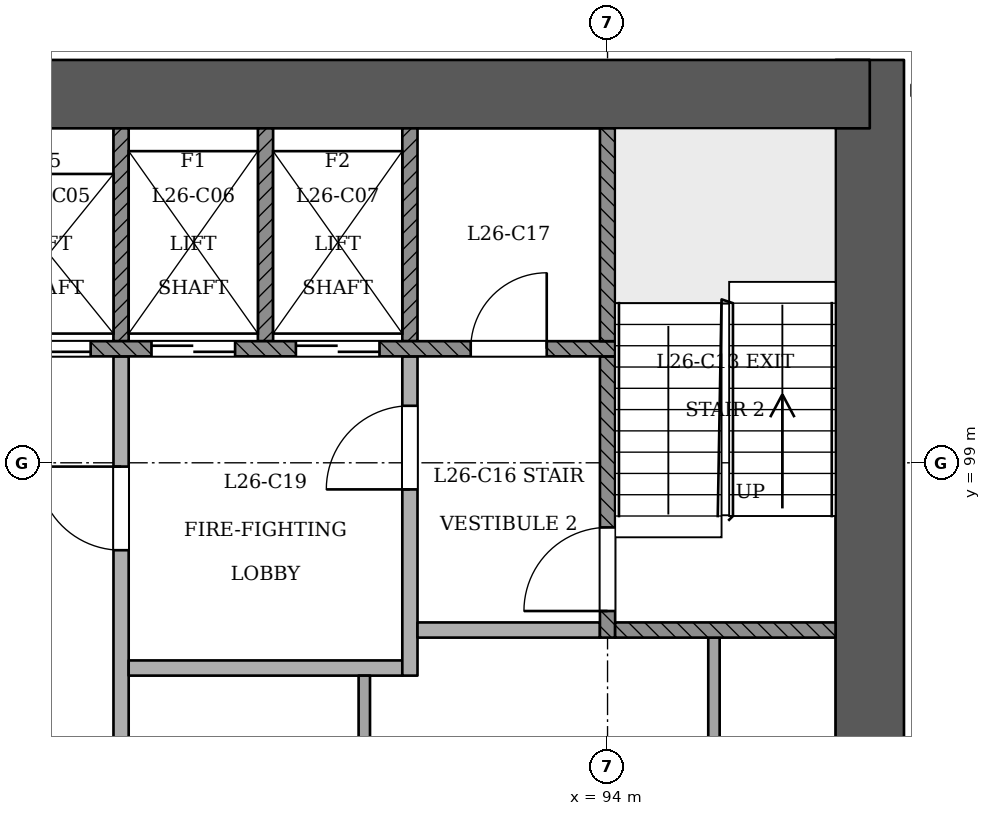
"""IFC4 building model, lengths in metres.
Left out: names, types, materials, properties, quantities, classifications, styles, units other than length and angle.
Written with IfcOpenShell. Run it as: python <this file> out.ifc"""

import sys

from ifc_helpers import new_model, si_unit, direction, frame, frame_2d, origin, place, context, subcontext, project, spatial, rectangle, extrude, element, fill, save


model = new_model("IFC4")
c1 = context("Model", 3, precision=1e-05, world=origin(), true_north=direction((0.0, 1.0)))
c2 = subcontext(c1, "Body", "Model", "MODEL_VIEW")
j1 = project(units=[si_unit("LENGTHUNIT", "METRE"), si_unit("PLANEANGLEUNIT", "RADIAN")], contexts=[c1])
p1 = place(None, origin())
s1 = spatial("IfcSite", under=j1, at=p1, CompositionType="ELEMENT")
p2 = place(p1, origin())
s2 = spatial("IfcBuilding", under=s1, at=p2, CompositionType="ELEMENT")
p3 = place(p2, frame((0.0, 0.0, 104.4)))
s3 = spatial("IfcBuildingStorey", under=s2, at=p3, CompositionType="ELEMENT", Elevation=104.4)
p4 = place(p3, frame((97.45, 92.95, 0.0), z_axis=(0.0, 0.0, 1.0), x_axis=(0.0, 1.0, 0.0)))
e1 = element("IfcWall", 1, at=p4, inside=s3, PredefinedType="SHEAR", context=c2, shape_type="SweptSolid", body=[
    extrude(rectangle(XDim=11.35, YDim=0.9, at=frame_2d((5.675, 0.0))), origin(), (0.0, 0.0, 1.0), 3.6),
])
p5 = place(p3, frame((97.45, 103.85, 0.0), z_axis=(0.0, 0.0, 1.0), x_axis=(-1.0, 0.0, 0.0)))
e2 = element("IfcWall", 2, at=p5, inside=s3, PredefinedType="SHEAR", context=c2, shape_type="SweptSolid", body=[
    extrude(rectangle(XDim=25.35, YDim=0.9, at=frame_2d((12.675, 0.0))), origin(), (0.0, 0.0, 1.0), 3.6),
])
p6 = place(p3, frame((85.42, 61.685, 0.0), z_axis=(0.0, 0.0, 1.0), x_axis=(0.500001045382, 0.866024800232, 0.0)))
e3 = element("IfcWall", 3, at=p6, inside=s3, PredefinedType="PARTITIONING", context=c2, shape_type="SweptSolid", body=[
    extrude(rectangle(XDim=41.671, YDim=0.15, at=frame_2d((20.836, 0.0))), origin(), (0.0, 0.0, 1.0), 2.7),
])
p7 = place(p6, frame((0.239, 0.0, 0.0)))
e4 = element("IfcOpeningElement", 4, at=p7, cuts=e3, PredefinedType="OPENING", context=c2, shape_type="SweptSolid", body=[
    extrude(rectangle(XDim=1.2, YDim=2.1, at=frame_2d((0.6, 1.05))), frame((0.0, 0.085, 0.0), z_axis=(0.0, -1.0, 0.0), x_axis=(1.0, 0.0, 0.0)), (0.0, 0.0, 1.0), 0.171),
])
p8 = place(p6, frame((5.636, 0.0, 0.0)))
e5 = element("IfcOpeningElement", 5, at=p8, cuts=e3, PredefinedType="OPENING", context=c2, shape_type="SweptSolid", body=[
    extrude(rectangle(XDim=1.2, YDim=2.1, at=frame_2d((0.6, 1.05))), frame((0.0, 0.085, 0.0), z_axis=(0.0, -1.0, 0.0), x_axis=(1.0, 0.0, 0.0)), (0.0, 0.0, 1.0), 0.171),
])
p9 = place(p6, frame((13.586, 0.0, 0.0)))
e6 = element("IfcOpeningElement", 6, at=p9, cuts=e3, PredefinedType="OPENING", context=c2, shape_type="SweptSolid", body=[
    extrude(rectangle(XDim=1.0, YDim=2.1, at=frame_2d((0.5, 1.05))), frame((0.0, 0.085, 0.0), z_axis=(0.0, -1.0, 0.0), x_axis=(1.0, 0.0, 0.0)), (0.0, 0.0, 1.0), 0.171),
])
p10 = place(p6, frame((18.086, 0.0, 0.0)))
e7 = element("IfcOpeningElement", 7, at=p10, cuts=e3, PredefinedType="OPENING", context=c2, shape_type="SweptSolid", body=[
    extrude(rectangle(XDim=1.0, YDim=2.1, at=frame_2d((0.5, 1.05))), frame((0.0, 0.085, 0.0), z_axis=(0.0, -1.0, 0.0), x_axis=(1.0, 0.0, 0.0)), (0.0, 0.0, 1.0), 0.171),
])
p11 = place(p6, frame((21.556, 0.0, 0.0)))
e8 = element("IfcOpeningElement", 8, at=p11, cuts=e3, PredefinedType="OPENING", context=c2, shape_type="SweptSolid", body=[
    extrude(rectangle(XDim=1.0, YDim=2.1, at=frame_2d((0.5, 1.05))), frame((0.0, 0.085, 0.0), z_axis=(0.0, -1.0, 0.0), x_axis=(1.0, 0.0, 0.0)), (0.0, 0.0, 1.0), 0.171),
])
p12 = place(p6, frame((27.086, 0.0, 0.0)))
e9 = element("IfcOpeningElement", 9, at=p12, cuts=e3, PredefinedType="OPENING", context=c2, shape_type="SweptSolid", body=[
    extrude(rectangle(XDim=1.0, YDim=2.1, at=frame_2d((0.5, 1.05))), frame((0.0, 0.085, 0.0), z_axis=(0.0, -1.0, 0.0), x_axis=(1.0, 0.0, 0.0)), (0.0, 0.0, 1.0), 0.171),
])
p13 = place(p6, frame((30.556, 0.0, 0.0)))
e10 = element("IfcOpeningElement", 10, at=p13, cuts=e3, PredefinedType="OPENING", context=c2, shape_type="SweptSolid", body=[
    extrude(rectangle(XDim=1.0, YDim=2.1, at=frame_2d((0.5, 1.05))), frame((0.0, 0.085, 0.0), z_axis=(0.0, -1.0, 0.0), x_axis=(1.0, 0.0, 0.0)), (0.0, 0.0, 1.0), 0.171),
])
p14 = place(p6, frame((37.604, 0.0, 0.0)))
e11 = element("IfcOpeningElement", 11, at=p14, cuts=e3, PredefinedType="OPENING", context=c2, shape_type="SweptSolid", body=[
    extrude(rectangle(XDim=1.2, YDim=2.1, at=frame_2d((0.6, 1.05))), frame((0.0, 0.085, 0.0), z_axis=(0.0, -1.0, 0.0), x_axis=(1.0, 0.0, 0.0)), (0.0, 0.0, 1.0), 0.171),
])
p15 = place(p3, frame((87.6, 93.4, 0.0), z_axis=(0.0, 0.0, 1.0), x_axis=(0.0, 1.0, 0.0)))
e12 = element("IfcWall", 12, at=p15, inside=s3, PredefinedType="PARTITIONING", context=c2, shape_type="SweptSolid", body=[
    extrude(rectangle(XDim=7.0, YDim=0.2, at=frame_2d((3.5, 0.0))), origin(), (0.0, 0.0, 1.0), 3.1),
])
p16 = place(p15, frame((4.45, 0.0, 0.0)))
e13 = element("IfcOpeningElement", 13, at=p16, cuts=e12, PredefinedType="OPENING", context=c2, shape_type="SweptSolid", body=[
    extrude(rectangle(XDim=1.1, YDim=2.1, at=frame_2d((0.55, 1.05))), frame((0.0, 0.11, 0.0), z_axis=(0.0, -1.0, 0.0), x_axis=(1.0, 0.0, 0.0)), (0.0, 0.0, 1.0), 0.221),
])
p17 = place(p3, frame((90.8, 93.4, 0.0), z_axis=(0.0, 0.0, 1.0), x_axis=(0.0, 1.0, 0.0)))
e14 = element("IfcWall", 14, at=p17, inside=s3, PredefinedType="PARTITIONING", context=c2, shape_type="SweptSolid", body=[
    extrude(rectangle(XDim=2.8, YDim=0.15, at=frame_2d((1.4, 0.0))), origin(), (0.0, 0.0, 1.0), 3.1),
])
p18 = place(p3, frame((95.4, 93.4, 0.0), z_axis=(0.0, 0.0, 1.0), x_axis=(0.0, 1.0, 0.0)))
e15 = element("IfcWall", 15, at=p18, inside=s3, PredefinedType="PARTITIONING", context=c2, shape_type="SweptSolid", body=[
    extrude(rectangle(XDim=3.3, YDim=0.15, at=frame_2d((1.65, 0.0))), origin(), (0.0, 0.0, 1.0), 3.1),
])
p19 = place(p3, frame((87.7, 96.3, 0.0), z_axis=(0.0, 0.0, 1.0), x_axis=(1.0, 0.0, 0.0)))
e16 = element("IfcWall", 16, at=p19, inside=s3, PredefinedType="PARTITIONING", context=c2, shape_type="SweptSolid", body=[
    extrude(rectangle(XDim=3.6, YDim=0.2, at=frame_2d((1.8, 0.0))), origin(), (0.0, 0.0, 1.0), 3.1),
])
p20 = place(p3, frame((91.4, 96.2, 0.0), z_axis=(0.0, 0.0, 1.0), x_axis=(0.0, 1.0, 0.0)))
e17 = element("IfcWall", 17, at=p20, inside=s3, PredefinedType="PARTITIONING", context=c2, shape_type="SweptSolid", body=[
    extrude(rectangle(XDim=4.2, YDim=0.2, at=frame_2d((2.1, 0.0))), origin(), (0.0, 0.0, 1.0), 3.1),
])
p21 = place(p20, frame((2.45, 0.0, 0.0)))
e18 = element("IfcOpeningElement", 18, at=p21, cuts=e17, PredefinedType="OPENING", context=c2, shape_type="SweptSolid", body=[
    extrude(rectangle(XDim=1.1, YDim=2.1, at=frame_2d((0.55, 1.05))), frame((0.0, 0.11, 0.0), z_axis=(0.0, -1.0, 0.0), x_axis=(1.0, 0.0, 0.0)), (0.0, 0.0, 1.0), 0.221),
])
p22 = place(p3, frame((91.5, 96.8, 0.0), z_axis=(0.0, 0.0, 1.0), x_axis=(1.0, 0.0, 0.0)))
e19 = element("IfcWall", 19, at=p22, inside=s3, PredefinedType="PARTITIONING", context=c2, shape_type="SweptSolid", body=[
    extrude(rectangle(XDim=2.4, YDim=0.2, at=frame_2d((1.2, 0.0))), origin(), (0.0, 0.0, 1.0), 3.1),
])
p23 = place(p3, frame((94.0, 96.7, 0.0), z_axis=(0.0, 0.0, 1.0), x_axis=(0.0, 1.0, 0.0)))
e20 = element("IfcWall", 20, at=p23, inside=s3, PredefinedType="SOLIDWALL", context=c2, shape_type="SweptSolid", body=[
    extrude(rectangle(XDim=3.7, YDim=0.2, at=frame_2d((1.85, 0.0))), origin(), (0.0, 0.0, 1.0), 3.1),
])
p24 = place(p23, frame((0.35, 0.0, 0.0)))
e21 = element("IfcOpeningElement", 21, at=p24, cuts=e20, PredefinedType="OPENING", context=c2, shape_type="SweptSolid", body=[
    extrude(rectangle(XDim=1.1, YDim=2.1, at=frame_2d((0.55, 1.05))), frame((0.0, 0.11, 0.0), z_axis=(0.0, -1.0, 0.0), x_axis=(1.0, 0.0, 0.0)), (0.0, 0.0, 1.0), 0.221),
])
p25 = place(p3, frame((94.1, 96.8, 0.0), z_axis=(0.0, 0.0, 1.0), x_axis=(1.0, 0.0, 0.0)))
e22 = element("IfcWall", 22, at=p25, inside=s3, PredefinedType="SOLIDWALL", context=c2, shape_type="SweptSolid", body=[
    extrude(rectangle(XDim=2.9, YDim=0.2, at=frame_2d((1.45, 0.0))), origin(), (0.0, 0.0, 1.0), 3.1),
])
p26 = place(p3, frame((75.9, 100.5, 0.0), z_axis=(0.0, 0.0, 1.0), x_axis=(1.0, 0.0, 0.0)))
e23 = element("IfcWall", 23, at=p26, inside=s3, PredefinedType="SOLIDWALL", context=c2, shape_type="SweptSolid", body=[
    extrude(rectangle(XDim=18.2, YDim=0.2, at=frame_2d((9.1, 0.0))), origin(), (0.0, 0.0, 1.0), 3.1),
])
p27 = place(p26, frame((2.6, 0.0, 0.0)))
e24 = element("IfcOpeningElement", 24, at=p27, cuts=e23, PredefinedType="OPENING", context=c2, shape_type="SweptSolid", body=[
    extrude(rectangle(XDim=1.1, YDim=2.1, at=frame_2d((0.55, 1.05))), frame((0.0, 0.11, 0.0), z_axis=(0.0, -1.0, 0.0), x_axis=(1.0, 0.0, 0.0)), (0.0, 0.0, 1.0), 0.221),
])
p28 = place(p26, frame((4.5, 0.0, 0.0)))
e25 = element("IfcOpeningElement", 25, at=p28, cuts=e23, PredefinedType="OPENING", context=c2, shape_type="SweptSolid", body=[
    extrude(rectangle(XDim=1.1, YDim=2.1, at=frame_2d((0.55, 1.05))), frame((0.0, 0.11, 0.0), z_axis=(0.0, -1.0, 0.0), x_axis=(1.0, 0.0, 0.0)), (0.0, 0.0, 1.0), 0.221),
])
p29 = place(p26, frame((6.4, 0.0, 0.0)))
e26 = element("IfcOpeningElement", 26, at=p29, cuts=e23, PredefinedType="OPENING", context=c2, shape_type="SweptSolid", body=[
    extrude(rectangle(XDim=1.1, YDim=2.1, at=frame_2d((0.55, 1.05))), frame((0.0, 0.11, 0.0), z_axis=(0.0, -1.0, 0.0), x_axis=(1.0, 0.0, 0.0)), (0.0, 0.0, 1.0), 0.221),
])
p30 = place(p26, frame((8.3, 0.0, 0.0)))
e27 = element("IfcOpeningElement", 27, at=p30, cuts=e23, PredefinedType="OPENING", context=c2, shape_type="SweptSolid", body=[
    extrude(rectangle(XDim=1.1, YDim=2.1, at=frame_2d((0.55, 1.05))), frame((0.0, 0.11, 0.0), z_axis=(0.0, -1.0, 0.0), x_axis=(1.0, 0.0, 0.0)), (0.0, 0.0, 1.0), 0.221),
])
p31 = place(p26, frame((10.2, 0.0, 0.0)))
e28 = element("IfcOpeningElement", 28, at=p31, cuts=e23, PredefinedType="OPENING", context=c2, shape_type="SweptSolid", body=[
    extrude(rectangle(XDim=1.1, YDim=2.1, at=frame_2d((0.55, 1.05))), frame((0.0, 0.11, 0.0), z_axis=(0.0, -1.0, 0.0), x_axis=(1.0, 0.0, 0.0)), (0.0, 0.0, 1.0), 0.221),
])
p32 = place(p26, frame((12.1, 0.0, 0.0)))
e29 = element("IfcOpeningElement", 29, at=p32, cuts=e23, PredefinedType="OPENING", context=c2, shape_type="SweptSolid", body=[
    extrude(rectangle(XDim=1.1, YDim=2.1, at=frame_2d((0.55, 1.05))), frame((0.0, 0.11, 0.0), z_axis=(0.0, -1.0, 0.0), x_axis=(1.0, 0.0, 0.0)), (0.0, 0.0, 1.0), 0.221),
])
p33 = place(p26, frame((14.0, 0.0, 0.0)))
e30 = element("IfcOpeningElement", 30, at=p33, cuts=e23, PredefinedType="OPENING", context=c2, shape_type="SweptSolid", body=[
    extrude(rectangle(XDim=1.1, YDim=2.1, at=frame_2d((0.55, 1.05))), frame((0.0, 0.11, 0.0), z_axis=(0.0, -1.0, 0.0), x_axis=(1.0, 0.0, 0.0)), (0.0, 0.0, 1.0), 0.221),
])
p34 = place(p26, frame((0.65, 0.0, 0.0)))
e31 = element("IfcOpeningElement", 31, at=p34, cuts=e23, PredefinedType="OPENING", context=c2, shape_type="SweptSolid", body=[
    extrude(rectangle(XDim=1.0, YDim=2.1, at=frame_2d((0.5, 1.05))), frame((0.0, 0.11, 0.0), z_axis=(0.0, -1.0, 0.0), x_axis=(1.0, 0.0, 0.0)), (0.0, 0.0, 1.0), 0.221),
])
p35 = place(p26, frame((16.3, 0.0, 0.0)))
e32 = element("IfcOpeningElement", 32, at=p35, cuts=e23, PredefinedType="OPENING", context=c2, shape_type="SweptSolid", body=[
    extrude(rectangle(XDim=1.0, YDim=2.1, at=frame_2d((0.5, 1.05))), frame((0.0, 0.11, 0.0), z_axis=(0.0, -1.0, 0.0), x_axis=(1.0, 0.0, 0.0)), (0.0, 0.0, 1.0), 0.221),
])
for number, where, z_axis, x_axis in (
    (33, (87.6, 100.6, 0.0), (0.0, 0.0, 1.0), (0.0, 1.0, 0.0)),
    (34, (89.5, 100.6, 0.0), (0.0, 0.0, 1.0), (0.0, 1.0, 0.0)),
    (35, (91.4, 100.6, 0.0), (0.0, 0.0, 1.0), (0.0, 1.0, 0.0)),
    (36, (94.0, 100.6, 0.0), (0.0, 0.0, 1.0), (0.0, 1.0, 0.0)),
):
    element("IfcWall", number, at=place(p3, frame(where, z_axis=z_axis, x_axis=x_axis)), inside=s3, PredefinedType="SOLIDWALL", context=c2, shape_type="SweptSolid", body=[
        extrude(rectangle(XDim=2.8, YDim=0.2, at=frame_2d((1.4, 0.0))), origin(), (0.0, 0.0, 1.0), 3.1),
    ])
p36 = place(p31, origin())
e37 = element("IfcDoor", 37, at=p36, inside=s3, OperationType="SLIDING_TO_RIGHT", PredefinedType="NOTDEFINED", context=c2, shape_type="SweptSolid", body=[
    extrude(rectangle(XDim=1.1, YDim=2.1, at=frame_2d((0.55, 1.05))), frame((0.0, 0.025, 0.0), z_axis=(0.0, -1.0, 0.0), x_axis=(1.0, 0.0, 0.0)), (0.0, 0.0, 1.0), 0.05),
])
fill(e28, e37)
p37 = place(p32, origin())
e38 = element("IfcDoor", 38, at=p37, inside=s3, OperationType="SLIDING_TO_RIGHT", PredefinedType="NOTDEFINED", context=c2, shape_type="SweptSolid", body=[
    extrude(rectangle(XDim=1.1, YDim=2.1, at=frame_2d((0.55, 1.05))), frame((0.0, 0.025, 0.0), z_axis=(0.0, -1.0, 0.0), x_axis=(1.0, 0.0, 0.0)), (0.0, 0.0, 1.0), 0.05),
])
fill(e29, e38)
p38 = place(p33, origin())
e39 = element("IfcDoor", 39, at=p38, inside=s3, OperationType="SLIDING_TO_LEFT", PredefinedType="NOTDEFINED", context=c2, shape_type="SweptSolid", body=[
    extrude(rectangle(XDim=1.1, YDim=2.1, at=frame_2d((0.55, 1.05))), frame((0.0, 0.025, 0.0), z_axis=(0.0, -1.0, 0.0), x_axis=(1.0, 0.0, 0.0)), (0.0, 0.0, 1.0), 0.05),
])
fill(e30, e39)
p39 = place(p24, origin())
e40 = element("IfcDoor", 40, at=p39, inside=s3, OperationType="SINGLE_SWING_LEFT", PredefinedType="NOTDEFINED", context=c2, shape_type="SweptSolid", body=[
    extrude(rectangle(XDim=1.1, YDim=2.1, at=frame_2d((0.55, 1.05))), frame((0.0, 0.025, 0.0), z_axis=(0.0, -1.0, 0.0), x_axis=(1.0, 0.0, 0.0)), (0.0, 0.0, 1.0), 0.05),
])
fill(e21, e40)
p40 = place(p16, origin())
e41 = element("IfcDoor", 41, at=p40, inside=s3, OperationType="SINGLE_SWING_RIGHT", PredefinedType="NOTDEFINED", context=c2, shape_type="SweptSolid", body=[
    extrude(rectangle(XDim=1.1, YDim=2.1, at=frame_2d((0.55, 1.05))), frame((0.0, 0.025, 0.0), z_axis=(0.0, -1.0, 0.0), x_axis=(1.0, 0.0, 0.0)), (0.0, 0.0, 1.0), 0.05),
])
fill(e13, e41)
p41 = place(p21, origin())
e42 = element("IfcDoor", 42, at=p41, inside=s3, OperationType="SINGLE_SWING_LEFT", PredefinedType="NOTDEFINED", context=c2, shape_type="SweptSolid", body=[
    extrude(rectangle(XDim=1.1, YDim=2.1, at=frame_2d((0.55, 1.05))), frame((0.0, 0.025, 0.0), z_axis=(0.0, -1.0, 0.0), x_axis=(1.0, 0.0, 0.0)), (0.0, 0.0, 1.0), 0.05),
])
fill(e18, e42)
p42 = place(p35, origin())
e43 = element("IfcDoor", 43, at=p42, inside=s3, OperationType="SINGLE_SWING_RIGHT", PredefinedType="NOTDEFINED", context=c2, shape_type="SweptSolid", body=[
    extrude(rectangle(XDim=1.0, YDim=2.1, at=frame_2d((0.5, 1.05))), frame((0.0, 0.025, 0.0), z_axis=(0.0, -1.0, 0.0), x_axis=(1.0, 0.0, 0.0)), (0.0, 0.0, 1.0), 0.05),
])
fill(e32, e43)
save(model, sys.argv[1])
